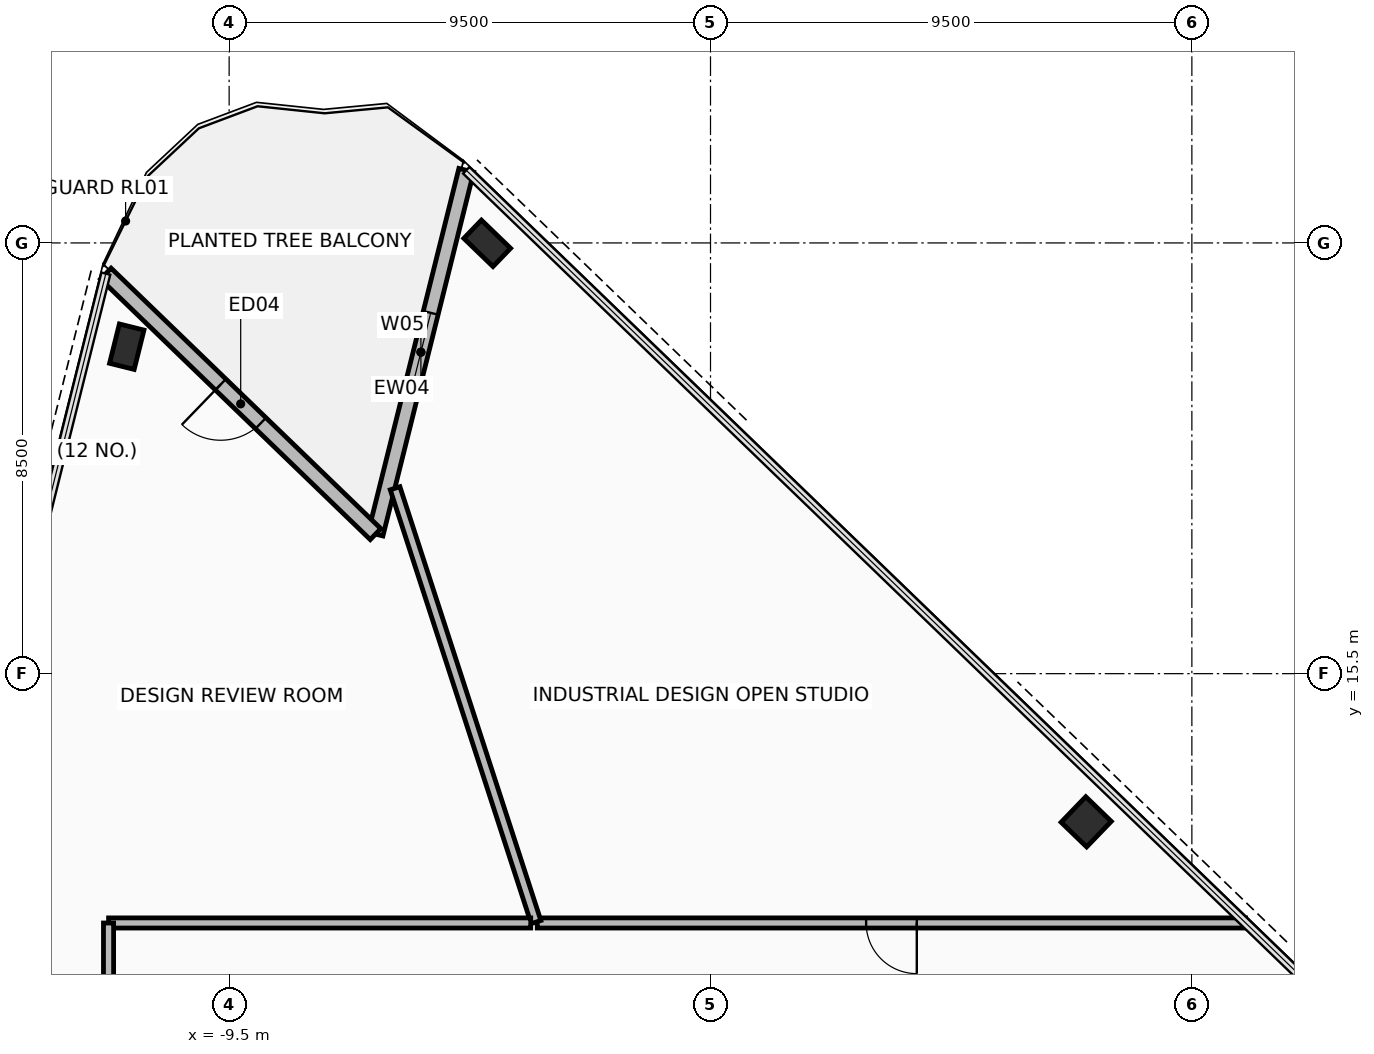
"""IFC4 building model, lengths in metres.
Left out: names, types, materials, properties, quantities, classifications, styles, units other than length and angle.
Written with IfcOpenShell. Run it as: python <this file> out.ifc"""

import sys

from ifc_helpers import new_model, si_unit, direction, frame, frame_2d, origin, origin_2d, place, context, subcontext, project, spatial, rectangle, hollow_rectangle, extrude, element, fill, save


model = new_model("IFC4")
c1 = context("Model", 3, precision=1e-05, world=origin(), true_north=direction((0.0, 1.0)))
c2 = subcontext(c1, "Body", "Model", "MODEL_VIEW")
j1 = project(units=[si_unit("LENGTHUNIT", "METRE"), si_unit("PLANEANGLEUNIT", "RADIAN")], contexts=[c1])
p1 = place(None, origin())
s1 = spatial("IfcSite", under=j1, at=p1, CompositionType="ELEMENT")
p2 = place(p1, origin())
s2 = spatial("IfcBuilding", under=s1, at=p2, CompositionType="ELEMENT")
p3 = place(p2, frame((0.0, 0.0, 100.5)))
s3 = spatial("IfcBuildingStorey", under=s2, at=p3, CompositionType="ELEMENT", Elevation=100.5)
p4 = place(p3, frame((-11.52, 21.952, 0.0), z_axis=(0.0, 0.0, 1.0), x_axis=(0.2419218956, 0.970295726276, 0.0)))
e1 = element("IfcColumn", 1, at=p4, inside=s3, PredefinedType="COLUMN", context=c2, shape_type="SweptSolid", body=[
    extrude(hollow_rectangle(XDim=0.5, YDim=0.8, WallThickness=0.04, at=origin_2d()), origin(), (0.0, 0.0, 1.0), 3.6),
])
p5 = place(p3, frame((7.415, 12.576, 0.0), z_axis=(0.0, 0.0, 1.0), x_axis=(-0.719339800339, 0.694658370459, 0.0)))
e2 = element("IfcColumn", 2, at=p5, inside=s3, PredefinedType="COLUMN", context=c2, shape_type="SweptSolid", body=[
    extrude(hollow_rectangle(XDim=0.7, YDim=0.7, WallThickness=0.04, at=origin_2d()), origin(), (0.0, 0.0, 1.0), 3.6),
])
p6 = place(p3, frame((-4.407, 23.992, 0.0), z_axis=(0.0, 0.0, 1.0), x_axis=(-0.719339800339, 0.694658370459, 0.0)))
e3 = element("IfcColumn", 3, at=p6, inside=s3, PredefinedType="COLUMN", context=c2, shape_type="SweptSolid", body=[
    extrude(hollow_rectangle(XDim=0.5, YDim=0.8, WallThickness=0.04, at=origin_2d()), origin(), (0.0, 0.0, 1.0), 3.6),
])
p7 = place(p3, frame((-4.82, 25.434, 0.0), z_axis=(0.0, 0.0, 1.0), x_axis=(-0.241930078207, -0.970293686086, 0.0)))
e4 = element("IfcWall", 4, at=p7, inside=s3, PredefinedType="STANDARD", context=c2, shape_type="SweptSolid", body=[
    extrude(rectangle(XDim=7.4, YDim=0.3, at=frame_2d((3.7, 0.0))), origin(), (0.0, 0.0, 1.0), 2.605),
])
p8 = place(p7, frame((2.9, 0.0, 0.25)))
e5 = element("IfcOpeningElement", 5, at=p8, cuts=e4, PredefinedType="OPENING", context=c2, shape_type="SweptSolid", body=[
    extrude(rectangle(XDim=1.6, YDim=2.2, at=frame_2d((0.8, 1.1))), frame((0.0, 0.16, 0.0), z_axis=(0.0, -1.0, 0.0), x_axis=(1.0, 0.0, 0.0)), (0.0, 0.0, 1.0), 0.32),
])
p9 = place(p3, frame((-6.611, 18.254, 0.0), z_axis=(0.0, 0.0, 1.0), x_axis=(-0.719321869339, 0.694676938073, 0.0)))
e6 = element("IfcWall", 6, at=p9, inside=s3, PredefinedType="STANDARD", context=c2, shape_type="SweptSolid", body=[
    extrude(rectangle(XDim=7.4, YDim=0.3, at=frame_2d((3.7, 0.0))), origin(), (0.0, 0.0, 1.0), 2.605),
])
p10 = place(p9, frame((3.15, 0.0, 0.0)))
e7 = element("IfcOpeningElement", 7, at=p10, cuts=e6, PredefinedType="OPENING", context=c2, shape_type="SweptSolid", body=[
    extrude(rectangle(XDim=1.1, YDim=2.2, at=frame_2d((0.55, 1.1))), frame((0.0, 0.16, 0.0), z_axis=(0.0, -1.0, 0.0), x_axis=(1.0, 0.0, 0.0)), (0.0, 0.0, 1.0), 0.32),
])
p11 = place(p3, frame((10.561, 10.58, 0.0), z_axis=(0.0, 0.0, 1.0), x_axis=(-1.0, 0.0, 0.0)))
e8 = element("IfcWall", 8, at=p11, inside=s3, PredefinedType="PARTITIONING", context=c2, shape_type="SweptSolid", body=[
    extrude(rectangle(XDim=13.981, YDim=0.2, at=frame_2d((6.99, 0.0))), origin(), (0.0, 0.0, 1.0), 2.605),
])
p12 = place(p11, frame((6.49, 0.0, 0.0)))
e9 = element("IfcOpeningElement", 9, at=p12, cuts=e8, PredefinedType="OPENING", context=c2, shape_type="SweptSolid", body=[
    extrude(rectangle(XDim=1.0, YDim=2.15, at=frame_2d((0.5, 1.075))), frame((0.0, 0.11, 0.0), z_axis=(0.0, -1.0, 0.0), x_axis=(1.0, 0.0, 0.0)), (0.0, 0.0, 1.0), 0.22),
])
p13 = place(p3, frame((-3.443, 10.597, 0.0), z_axis=(0.0, 0.0, 1.0), x_axis=(-0.309010029932, 0.951058779152, 0.0)))
e10 = element("IfcWall", 10, at=p13, inside=s3, PredefinedType="PARTITIONING", context=c2, shape_type="SweptSolid", body=[
    extrude(rectangle(XDim=9.002, YDim=0.2, at=frame_2d((4.501, 0.0))), origin(), (0.0, 0.0, 1.0), 2.805),
])
p14 = place(p3, frame((-3.548, 10.58, 0.0), z_axis=(0.0, 0.0, 1.0), x_axis=(-1.0, 0.0, 0.0)))
e11 = element("IfcWall", 11, at=p14, inside=s3, PredefinedType="PARTITIONING", context=c2, shape_type="SweptSolid", body=[
    extrude(rectangle(XDim=8.331, YDim=0.2, at=frame_2d((4.166, 0.0))), origin(), (0.0, 0.0, 1.0), 2.755),
])
p15 = place(p3, frame((-11.88, 10.579, 0.0), z_axis=(0.0, 0.0, 1.0), x_axis=(0.0, -1.0, 0.0)))
e12 = element("IfcWall", 12, at=p15, inside=s3, PredefinedType="PARTITIONING", context=c2, shape_type="SweptSolid", body=[
    extrude(rectangle(XDim=13.522, YDim=0.2, at=frame_2d((6.761, 0.0))), origin(), (0.0, 0.0, 1.0), 2.805),
])
p16 = place(p15, frame((6.161, 0.0, 0.0)))
e13 = element("IfcOpeningElement", 13, at=p16, cuts=e12, PredefinedType="OPENING", context=c2, shape_type="SweptSolid", body=[
    extrude(rectangle(XDim=1.2, YDim=2.15, at=frame_2d((0.6, 1.075))), frame((0.0, 0.11, 0.0), z_axis=(0.0, -1.0, 0.0), x_axis=(1.0, 0.0, 0.0)), (0.0, 0.0, 1.0), 0.22),
])
p17 = place(p10, frame((1.1, 0.0, 0.0), z_axis=(0.0, 0.0, 1.0), x_axis=(-1.0, 0.0, 0.0)))
e14 = element("IfcDoor", 14, at=p17, inside=s3, OperationType="SINGLE_SWING_LEFT", PredefinedType="DOOR", context=c2, shape_type="SweptSolid", body=[
    extrude(rectangle(XDim=1.1, YDim=2.2, at=frame_2d((0.55, 1.1))), frame((0.0, 0.025, 0.0), z_axis=(0.0, -1.0, 0.0), x_axis=(1.0, 0.0, 0.0)), (0.0, 0.0, 1.0), 0.05),
])
fill(e7, e14)
p18 = place(p8, origin())
e15 = element("IfcWindow", 15, at=p18, inside=s3, PartitioningType="SINGLE_PANEL", PredefinedType="WINDOW", context=c2, shape_type="SweptSolid", body=[
    extrude(rectangle(XDim=1.6, YDim=2.2, at=frame_2d((0.8, 1.1))), frame((0.0, 0.03, 0.0), z_axis=(0.0, -1.0, 0.0), x_axis=(1.0, 0.0, 0.0)), (0.0, 0.0, 1.0), 0.06),
])
fill(e5, e15)
p19 = place(p12, origin())
e16 = element("IfcDoor", 16, at=p19, inside=s3, OperationType="SINGLE_SWING_RIGHT", PredefinedType="DOOR", context=c2, shape_type="SweptSolid", body=[
    extrude(rectangle(XDim=1.0, YDim=2.15, at=frame_2d((0.5, 1.075))), frame((0.0, 0.025, 0.0), z_axis=(0.0, -1.0, 0.0), x_axis=(1.0, 0.0, 0.0)), (0.0, 0.0, 1.0), 0.05),
])
fill(e9, e16)
save(model, sys.argv[1])
